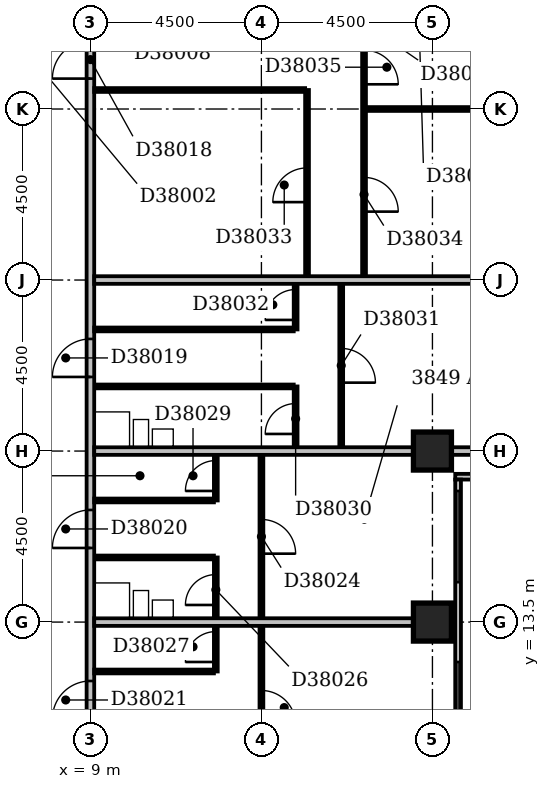
"""IFC4 building model, lengths in metres.
Left out: names, types, materials, properties, quantities, classifications, styles, units other than length and angle.
Written with IfcOpenShell. Run it as: python <this file> out.ifc"""

import sys

from ifc_helpers import new_model, si_unit, direction, frame, frame_2d, origin, origin_2d, place, context, subcontext, project, spatial, rectangle, extrude, element, fill, save


model = new_model("IFC4")
c1 = context("Model", 3, precision=1e-05, world=origin(), true_north=direction((0.0, 1.0)))
c2 = subcontext(c1, "Body", "Model", "MODEL_VIEW")
j1 = project(units=[si_unit("LENGTHUNIT", "METRE"), si_unit("PLANEANGLEUNIT", "RADIAN")], contexts=[c1])
p1 = place(None, origin())
s1 = spatial("IfcSite", under=j1, at=p1, CompositionType="ELEMENT")
p2 = place(p1, origin())
s2 = spatial("IfcBuilding", under=s1, at=p2, CompositionType="ELEMENT")
p3 = place(p2, frame((0.0, 0.0, 152.0)))
s3 = spatial("IfcBuildingStorey", under=s2, at=p3, CompositionType="ELEMENT", Elevation=152.0)
for number, where, z_axis, x_axis in (
    (1, (18.0, 13.5, -0.3), (0.0, 0.0, 1.0), (1.0, 0.0, 0.0)),
    (2, (18.0, 18.0, -0.3), (0.0, 0.0, 1.0), (1.0, 0.0, 0.0)),
):
    element("IfcColumn", number, at=place(p3, frame(where, z_axis=z_axis, x_axis=x_axis)), inside=s3, PredefinedType="COLUMN", context=c2, shape_type="SweptSolid", body=[
        extrude(rectangle(XDim=1.0, YDim=1.0, at=origin_2d()), origin(), (0.0, 0.0, 1.0), 3.6),
    ])
p4 = place(p3, frame((18.675, 8.4, 0.0), z_axis=(0.0, 0.0, 1.0), x_axis=(0.0, 1.0, 0.0)))
e3 = element("IfcWall", 3, at=p4, inside=s3, PredefinedType="STANDARD", context=c2, shape_type="SweptSolid", body=[
    extrude(rectangle(XDim=8.85, YDim=0.15, at=frame_2d((4.425, 0.0))), origin(), (0.0, 0.0, 1.0), 2.7),
])
p5 = place(p4, frame((1.65, 0.0, 0.6)))
e4 = element("IfcOpeningElement", 4, at=p5, cuts=e3, PredefinedType="OPENING", context=c2, shape_type="SweptSolid", body=[
    extrude(rectangle(XDim=2.4, YDim=1.8, at=frame_2d((1.2, 0.9))), frame((0.0, 0.087, 0.0), z_axis=(0.0, -1.0, 0.0), x_axis=(1.0, 0.0, 0.0)), (0.0, 0.0, 1.0), 0.174),
])
p6 = place(p4, frame((6.15, 0.0, 0.6)))
e5 = element("IfcOpeningElement", 5, at=p6, cuts=e3, PredefinedType="OPENING", context=c2, shape_type="SweptSolid", body=[
    extrude(rectangle(XDim=2.4, YDim=1.8, at=frame_2d((1.2, 0.9))), frame((0.0, 0.087, 0.0), z_axis=(0.0, -1.0, 0.0), x_axis=(1.0, 0.0, 0.0)), (0.0, 0.0, 1.0), 0.174),
])
p7 = place(p3, frame((18.6, 17.325, 0.0), z_axis=(0.0, 0.0, 1.0), x_axis=(1.0, 0.0, 0.0)))
e6 = element("IfcWall", 6, at=p7, inside=s3, PredefinedType="STANDARD", context=c2, shape_type="SweptSolid", body=[
    extrude(rectangle(XDim=4.65, YDim=0.15, at=frame_2d((2.325, 0.0))), origin(), (0.0, 0.0, 1.0), 2.7),
])
p8 = place(p7, frame((0.45, 0.0, 0.6)))
e7 = element("IfcOpeningElement", 7, at=p8, cuts=e6, PredefinedType="OPENING", context=c2, shape_type="SweptSolid", body=[
    extrude(rectangle(XDim=2.4, YDim=1.8, at=frame_2d((1.2, 0.9))), frame((0.0, 0.087, 0.0), z_axis=(0.0, -1.0, 0.0), x_axis=(1.0, 0.0, 0.0)), (0.0, 0.0, 1.0), 0.174),
])
p9 = place(p3, frame((9.0, 5.0, 0.0), z_axis=(0.0, 0.0, 1.0), x_axis=(0.0, 1.0, 0.0)))
e8 = element("IfcWall", 8, at=p9, inside=s3, PredefinedType="PARTITIONING", context=c2, shape_type="SweptSolid", body=[
    extrude(rectangle(XDim=27.75, YDim=0.2, at=frame_2d((13.875, 0.0))), origin(), (0.0, 0.0, 1.0), 3.3),
])
p10 = place(p9, frame((22.8, 0.0, 0.0)))
e9 = element("IfcOpeningElement", 9, at=p10, cuts=e8, PredefinedType="OPENING", context=c2, shape_type="SweptSolid", body=[
    extrude(rectangle(XDim=1.0, YDim=2.1, at=frame_2d((0.5, 1.05))), frame((0.0, 0.112, 0.0), z_axis=(0.0, -1.0, 0.0), x_axis=(1.0, 0.0, 0.0)), (0.0, 0.0, 1.0), 0.224),
])
p11 = place(p9, frame((14.95, 0.0, 0.0)))
e10 = element("IfcOpeningElement", 10, at=p11, cuts=e8, PredefinedType="OPENING", context=c2, shape_type="SweptSolid", body=[
    extrude(rectangle(XDim=1.0, YDim=2.1, at=frame_2d((0.5, 1.05))), frame((0.0, 0.112, 0.0), z_axis=(0.0, -1.0, 0.0), x_axis=(1.0, 0.0, 0.0)), (0.0, 0.0, 1.0), 0.224),
])
p12 = place(p9, frame((10.45, 0.0, 0.0)))
e11 = element("IfcOpeningElement", 11, at=p12, cuts=e8, PredefinedType="OPENING", context=c2, shape_type="SweptSolid", body=[
    extrude(rectangle(XDim=1.0, YDim=2.1, at=frame_2d((0.5, 1.05))), frame((0.0, 0.112, 0.0), z_axis=(0.0, -1.0, 0.0), x_axis=(1.0, 0.0, 0.0)), (0.0, 0.0, 1.0), 0.224),
])
p13 = place(p9, frame((5.95, 0.0, 0.0)))
e12 = element("IfcOpeningElement", 12, at=p13, cuts=e8, PredefinedType="OPENING", context=c2, shape_type="SweptSolid", body=[
    extrude(rectangle(XDim=1.0, YDim=2.1, at=frame_2d((0.5, 1.05))), frame((0.0, 0.112, 0.0), z_axis=(0.0, -1.0, 0.0), x_axis=(1.0, 0.0, 0.0)), (0.0, 0.0, 1.0), 0.224),
])
p14 = place(p9, frame((1.5, 0.0, 0.0)))
e13 = element("IfcOpeningElement", 13, at=p14, cuts=e8, PredefinedType="OPENING", context=c2, shape_type="SweptSolid", body=[
    extrude(rectangle(XDim=0.9, YDim=2.1, at=frame_2d((0.45, 1.05))), frame((0.0, 0.112, 0.0), z_axis=(0.0, -1.0, 0.0), x_axis=(1.0, 0.0, 0.0)), (0.0, 0.0, 1.0), 0.224),
])
p15 = place(p3, frame((13.5, 9.5, 0.0), z_axis=(0.0, 0.0, 1.0), x_axis=(0.0, 1.0, 0.0)))
e14 = element("IfcWall", 14, at=p15, inside=s3, PredefinedType="PARTITIONING", context=c2, shape_type="SweptSolid", body=[
    extrude(rectangle(XDim=8.4, YDim=0.1, at=frame_2d((4.2, 0.0))), origin(), (0.0, 0.0, 1.0), 3.3),
])
p16 = place(p15, frame((5.8, 0.0, 0.0)))
e15 = element("IfcOpeningElement", 15, at=p16, cuts=e14, PredefinedType="OPENING", context=c2, shape_type="SweptSolid", body=[
    extrude(rectangle(XDim=0.9, YDim=2.1, at=frame_2d((0.45, 1.05))), frame((0.0, 0.062, 0.0), z_axis=(0.0, -1.0, 0.0), x_axis=(1.0, 0.0, 0.0)), (0.0, 0.0, 1.0), 0.124),
])
p17 = place(p15, frame((1.3, 0.0, 0.0)))
e16 = element("IfcOpeningElement", 16, at=p17, cuts=e14, PredefinedType="OPENING", context=c2, shape_type="SweptSolid", body=[
    extrude(rectangle(XDim=0.9, YDim=2.1, at=frame_2d((0.45, 1.05))), frame((0.0, 0.062, 0.0), z_axis=(0.0, -1.0, 0.0), x_axis=(1.0, 0.0, 0.0)), (0.0, 0.0, 1.0), 0.124),
])
p18 = place(p3, frame((9.1, 12.2, 0.0), z_axis=(0.0, 0.0, 1.0), x_axis=(1.0, 0.0, 0.0)))
e17 = element("IfcWall", 17, at=p18, inside=s3, PredefinedType="PARTITIONING", context=c2, shape_type="SweptSolid", body=[
    extrude(rectangle(XDim=3.15, YDim=0.1, at=frame_2d((1.575, 0.0))), origin(), (0.0, 0.0, 1.0), 3.3),
])
p19 = place(p3, frame((12.3, 12.2, 0.0), z_axis=(0.0, 0.0, 1.0), x_axis=(0.0, 1.0, 0.0)))
e18 = element("IfcWall", 18, at=p19, inside=s3, PredefinedType="PARTITIONING", context=c2, shape_type="SweptSolid", body=[
    extrude(rectangle(XDim=3.0, YDim=0.1, at=frame_2d((1.5, 0.0))), origin(), (0.0, 0.0, 1.0), 3.3),
])
p20 = place(p19, frame((1.75, 0.0, 0.0)))
e19 = element("IfcOpeningElement", 19, at=p20, cuts=e18, PredefinedType="OPENING", context=c2, shape_type="SweptSolid", body=[
    extrude(rectangle(XDim=0.8, YDim=2.1, at=frame_2d((0.4, 1.05))), frame((0.0, 0.062, 0.0), z_axis=(0.0, -1.0, 0.0), x_axis=(1.0, 0.0, 0.0)), (0.0, 0.0, 1.0), 0.124),
])
p21 = place(p19, frame((0.25, 0.0, 0.0)))
e20 = element("IfcOpeningElement", 20, at=p21, cuts=e18, PredefinedType="OPENING", context=c2, shape_type="SweptSolid", body=[
    extrude(rectangle(XDim=0.8, YDim=2.1, at=frame_2d((0.4, 1.05))), frame((0.0, 0.062, 0.0), z_axis=(0.0, -1.0, 0.0), x_axis=(1.0, 0.0, 0.0)), (0.0, 0.0, 1.0), 0.124),
])
p22 = place(p3, frame((9.1, 13.5, 0.0), z_axis=(0.0, 0.0, 1.0), x_axis=(1.0, 0.0, 0.0)))
e21 = element("IfcWall", 21, at=p22, inside=s3, PredefinedType="PARTITIONING", context=c2, shape_type="SweptSolid", body=[
    extrude(rectangle(XDim=8.4, YDim=0.2, at=frame_2d((4.2, 0.0))), origin(), (0.0, 0.0, 1.0), 3.3),
])
p23 = place(p3, frame((9.1, 15.2, 0.0), z_axis=(0.0, 0.0, 1.0), x_axis=(1.0, 0.0, 0.0)))
e22 = element("IfcWall", 22, at=p23, inside=s3, PredefinedType="PLUMBINGWALL", context=c2, shape_type="SweptSolid", body=[
    extrude(rectangle(XDim=3.15, YDim=0.1, at=frame_2d((1.575, 0.0))), origin(), (0.0, 0.0, 1.0), 3.3),
])
p24 = place(p3, frame((9.1, 16.7, 0.0), z_axis=(0.0, 0.0, 1.0), x_axis=(1.0, 0.0, 0.0)))
e23 = element("IfcWall", 23, at=p24, inside=s3, PredefinedType="PARTITIONING", context=c2, shape_type="SweptSolid", body=[
    extrude(rectangle(XDim=3.15, YDim=0.1, at=frame_2d((1.575, 0.0))), origin(), (0.0, 0.0, 1.0), 3.3),
])
p25 = place(p3, frame((12.3, 16.7, 0.0), z_axis=(0.0, 0.0, 1.0), x_axis=(0.0, 1.0, 0.0)))
e24 = element("IfcWall", 24, at=p25, inside=s3, PredefinedType="PARTITIONING", context=c2, shape_type="SweptSolid", body=[
    extrude(rectangle(XDim=1.2, YDim=0.1, at=frame_2d((0.6, 0.0))), origin(), (0.0, 0.0, 1.0), 3.3),
])
p26 = place(p25, frame((0.25, 0.0, 0.0)))
e25 = element("IfcOpeningElement", 25, at=p26, cuts=e24, PredefinedType="OPENING", context=c2, shape_type="SweptSolid", body=[
    extrude(rectangle(XDim=0.8, YDim=2.1, at=frame_2d((0.4, 1.05))), frame((0.0, 0.062, 0.0), z_axis=(0.0, -1.0, 0.0), x_axis=(1.0, 0.0, 0.0)), (0.0, 0.0, 1.0), 0.124),
])
p27 = place(p3, frame((9.1, 18.0, 0.0), z_axis=(0.0, 0.0, 1.0), x_axis=(1.0, 0.0, 0.0)))
e26 = element("IfcWall", 26, at=p27, inside=s3, PredefinedType="PARTITIONING", context=c2, shape_type="SweptSolid", body=[
    extrude(rectangle(XDim=8.4, YDim=0.2, at=frame_2d((4.2, 0.0))), origin(), (0.0, 0.0, 1.0), 2.6),
])
p28 = place(p3, frame((18.5, 18.0, 0.0), z_axis=(0.0, 0.0, 1.0), x_axis=(1.0, 0.0, 0.0)))
e27 = element("IfcWall", 27, at=p28, inside=s3, PredefinedType="PARTITIONING", context=c2, shape_type="SweptSolid", body=[
    extrude(rectangle(XDim=3.5, YDim=0.2, at=frame_2d((1.75, 0.0))), origin(), (0.0, 0.0, 1.0), 2.7),
])
p29 = place(p3, frame((14.4, 18.1, 0.0), z_axis=(0.0, 0.0, 1.0), x_axis=(0.0, 1.0, 0.0)))
e28 = element("IfcWall", 28, at=p29, inside=s3, PredefinedType="PARTITIONING", context=c2, shape_type="SweptSolid", body=[
    extrude(rectangle(XDim=1.6, YDim=0.1, at=frame_2d((0.8, 0.0))), origin(), (0.0, 0.0, 1.0), 3.3),
])
p30 = place(p29, frame((0.35, 0.0, 0.0)))
e29 = element("IfcOpeningElement", 29, at=p30, cuts=e28, PredefinedType="OPENING", context=c2, shape_type="SweptSolid", body=[
    extrude(rectangle(XDim=0.8, YDim=2.1, at=frame_2d((0.4, 1.05))), frame((0.0, 0.062, 0.0), z_axis=(0.0, -1.0, 0.0), x_axis=(1.0, 0.0, 0.0)), (0.0, 0.0, 1.0), 0.124),
])
p31 = place(p3, frame((15.6, 18.1, 0.0), z_axis=(0.0, 0.0, 1.0), x_axis=(0.0, 1.0, 0.0)))
e30 = element("IfcWall", 30, at=p31, inside=s3, PredefinedType="PARTITIONING", context=c2, shape_type="SweptSolid", body=[
    extrude(rectangle(XDim=4.3, YDim=0.1, at=frame_2d((2.15, 0.0))), origin(), (0.0, 0.0, 1.0), 3.3),
])
p32 = place(p31, frame((1.7, 0.0, 0.0)))
e31 = element("IfcOpeningElement", 31, at=p32, cuts=e30, PredefinedType="OPENING", context=c2, shape_type="SweptSolid", body=[
    extrude(rectangle(XDim=0.9, YDim=2.1, at=frame_2d((0.45, 1.05))), frame((0.0, 0.062, 0.0), z_axis=(0.0, -1.0, 0.0), x_axis=(1.0, 0.0, 0.0)), (0.0, 0.0, 1.0), 0.124),
])
p33 = place(p3, frame((9.1, 19.7, 0.0), z_axis=(0.0, 0.0, 1.0), x_axis=(1.0, 0.0, 0.0)))
e32 = element("IfcWall", 32, at=p33, inside=s3, PredefinedType="PLUMBINGWALL", context=c2, shape_type="SweptSolid", body=[
    extrude(rectangle(XDim=5.25, YDim=0.1, at=frame_2d((2.625, 0.0))), origin(), (0.0, 0.0, 1.0), 3.3),
])
p34 = place(p3, frame((9.1, 21.2, 0.0), z_axis=(0.0, 0.0, 1.0), x_axis=(1.0, 0.0, 0.0)))
e33 = element("IfcWall", 33, at=p34, inside=s3, PredefinedType="PARTITIONING", context=c2, shape_type="SweptSolid", body=[
    extrude(rectangle(XDim=5.25, YDim=0.1, at=frame_2d((2.625, 0.0))), origin(), (0.0, 0.0, 1.0), 3.3),
])
p35 = place(p3, frame((14.4, 21.2, 0.0), z_axis=(0.0, 0.0, 1.0), x_axis=(0.0, 1.0, 0.0)))
e34 = element("IfcWall", 34, at=p35, inside=s3, PredefinedType="PARTITIONING", context=c2, shape_type="SweptSolid", body=[
    extrude(rectangle(XDim=1.2, YDim=0.1, at=frame_2d((0.6, 0.0))), origin(), (0.0, 0.0, 1.0), 3.3),
])
p36 = place(p35, frame((0.25, 0.0, 0.0)))
e35 = element("IfcOpeningElement", 35, at=p36, cuts=e34, PredefinedType="OPENING", context=c2, shape_type="SweptSolid", body=[
    extrude(rectangle(XDim=0.8, YDim=2.1, at=frame_2d((0.4, 1.05))), frame((0.0, 0.062, 0.0), z_axis=(0.0, -1.0, 0.0), x_axis=(1.0, 0.0, 0.0)), (0.0, 0.0, 1.0), 0.124),
])
p37 = place(p3, frame((9.1, 22.5, 0.0), z_axis=(0.0, 0.0, 1.0), x_axis=(1.0, 0.0, 0.0)))
e36 = element("IfcWall", 36, at=p37, inside=s3, PredefinedType="PARTITIONING", context=c2, shape_type="SweptSolid", body=[
    extrude(rectangle(XDim=12.9, YDim=0.2, at=frame_2d((6.45, 0.0))), origin(), (0.0, 0.0, 1.0), 3.3),
])
p38 = place(p3, frame((14.7, 22.6, 0.0), z_axis=(0.0, 0.0, 1.0), x_axis=(0.0, 1.0, 0.0)))
e37 = element("IfcWall", 37, at=p38, inside=s3, PredefinedType="PARTITIONING", context=c2, shape_type="SweptSolid", body=[
    extrude(rectangle(XDim=4.9, YDim=0.1, at=frame_2d((2.45, 0.0))), origin(), (0.0, 0.0, 1.0), 3.3),
])
p39 = place(p38, frame((1.95, 0.0, 0.0)))
e38 = element("IfcOpeningElement", 38, at=p39, cuts=e37, PredefinedType="OPENING", context=c2, shape_type="SweptSolid", body=[
    extrude(rectangle(XDim=0.9, YDim=2.1, at=frame_2d((0.45, 1.05))), frame((0.0, 0.062, 0.0), z_axis=(0.0, -1.0, 0.0), x_axis=(1.0, 0.0, 0.0)), (0.0, 0.0, 1.0), 0.124),
])
p40 = place(p3, frame((16.2, 22.6, 0.0), z_axis=(0.0, 0.0, 1.0), x_axis=(0.0, 1.0, 0.0)))
e39 = element("IfcWall", 39, at=p40, inside=s3, PredefinedType="PARTITIONING", context=c2, shape_type="SweptSolid", body=[
    extrude(rectangle(XDim=8.8, YDim=0.1, at=frame_2d((4.4, 0.0))), origin(), (0.0, 0.0, 1.0), 3.3),
])
p41 = place(p40, frame((1.7, 0.0, 0.0)))
e40 = element("IfcOpeningElement", 40, at=p41, cuts=e39, PredefinedType="OPENING", context=c2, shape_type="SweptSolid", body=[
    extrude(rectangle(XDim=0.9, YDim=2.1, at=frame_2d((0.45, 1.05))), frame((0.0, 0.062, 0.0), z_axis=(0.0, -1.0, 0.0), x_axis=(1.0, 0.0, 0.0)), (0.0, 0.0, 1.0), 0.124),
])
p42 = place(p40, frame((5.05, 0.0, 0.0)))
e41 = element("IfcOpeningElement", 41, at=p42, cuts=e39, PredefinedType="OPENING", context=c2, shape_type="SweptSolid", body=[
    extrude(rectangle(XDim=0.9, YDim=2.1, at=frame_2d((0.45, 1.05))), frame((0.0, 0.062, 0.0), z_axis=(0.0, -1.0, 0.0), x_axis=(1.0, 0.0, 0.0)), (0.0, 0.0, 1.0), 0.124),
])
p43 = place(p3, frame((16.25, 27.0, 0.0), z_axis=(0.0, 0.0, 1.0), x_axis=(1.0, 0.0, 0.0)))
e42 = element("IfcWall", 42, at=p43, inside=s3, PredefinedType="PARTITIONING", context=c2, shape_type="SweptSolid", body=[
    extrude(rectangle(XDim=5.75, YDim=0.1, at=frame_2d((2.875, 0.0))), origin(), (0.0, 0.0, 1.0), 2.7),
])
p44 = place(p3, frame((9.1, 27.5, 0.0), z_axis=(0.0, 0.0, 1.0), x_axis=(1.0, 0.0, 0.0)))
e43 = element("IfcWall", 43, at=p44, inside=s3, PredefinedType="PARTITIONING", context=c2, shape_type="SweptSolid", body=[
    extrude(rectangle(XDim=5.55, YDim=0.1, at=frame_2d((2.775, 0.0))), origin(), (0.0, 0.0, 1.0), 2.7),
])
p45 = place(p5, origin())
e44 = element("IfcWindow", 44, at=p45, inside=s3, PartitioningType="SINGLE_PANEL", PredefinedType="WINDOW", context=c2, shape_type="SweptSolid", body=[
    extrude(rectangle(XDim=2.4, YDim=1.8, at=frame_2d((1.2, 0.9))), frame((0.0, 0.03, 0.0), z_axis=(0.0, -1.0, 0.0), x_axis=(1.0, 0.0, 0.0)), (0.0, 0.0, 1.0), 0.06),
])
fill(e4, e44)
p46 = place(p6, origin())
e45 = element("IfcWindow", 45, at=p46, inside=s3, PartitioningType="SINGLE_PANEL", PredefinedType="WINDOW", context=c2, shape_type="SweptSolid", body=[
    extrude(rectangle(XDim=2.4, YDim=1.8, at=frame_2d((1.2, 0.9))), frame((0.0, 0.03, 0.0), z_axis=(0.0, -1.0, 0.0), x_axis=(1.0, 0.0, 0.0)), (0.0, 0.0, 1.0), 0.06),
])
fill(e5, e45)
p47 = place(p10, origin())
e46 = element("IfcDoor", 46, at=p47, inside=s3, OperationType="SINGLE_SWING_LEFT", PredefinedType="DOOR", context=c2, shape_type="SweptSolid", body=[
    extrude(rectangle(XDim=1.0, YDim=2.1, at=frame_2d((0.5, 1.05))), frame((0.0, 0.025, 0.0), z_axis=(0.0, -1.0, 0.0), x_axis=(1.0, 0.0, 0.0)), (0.0, 0.0, 1.0), 0.05),
])
fill(e9, e46)
p48 = place(p11, origin())
e47 = element("IfcDoor", 47, at=p48, inside=s3, OperationType="SINGLE_SWING_LEFT", PredefinedType="DOOR", context=c2, shape_type="SweptSolid", body=[
    extrude(rectangle(XDim=1.0, YDim=2.1, at=frame_2d((0.5, 1.05))), frame((0.0, 0.025, 0.0), z_axis=(0.0, -1.0, 0.0), x_axis=(1.0, 0.0, 0.0)), (0.0, 0.0, 1.0), 0.05),
])
fill(e10, e47)
p49 = place(p12, origin())
e48 = element("IfcDoor", 48, at=p49, inside=s3, OperationType="SINGLE_SWING_LEFT", PredefinedType="DOOR", context=c2, shape_type="SweptSolid", body=[
    extrude(rectangle(XDim=1.0, YDim=2.1, at=frame_2d((0.5, 1.05))), frame((0.0, 0.025, 0.0), z_axis=(0.0, -1.0, 0.0), x_axis=(1.0, 0.0, 0.0)), (0.0, 0.0, 1.0), 0.05),
])
fill(e11, e48)
p50 = place(p13, origin())
e49 = element("IfcDoor", 49, at=p50, inside=s3, OperationType="SINGLE_SWING_LEFT", PredefinedType="DOOR", context=c2, shape_type="SweptSolid", body=[
    extrude(rectangle(XDim=1.0, YDim=2.1, at=frame_2d((0.5, 1.05))), frame((0.0, 0.025, 0.0), z_axis=(0.0, -1.0, 0.0), x_axis=(1.0, 0.0, 0.0)), (0.0, 0.0, 1.0), 0.05),
])
fill(e12, e49)
p51 = place(p16, frame((0.9, 0.0, 0.0), z_axis=(0.0, 0.0, 1.0), x_axis=(-1.0, 0.0, 0.0)))
e50 = element("IfcDoor", 50, at=p51, inside=s3, OperationType="SINGLE_SWING_RIGHT", PredefinedType="DOOR", context=c2, shape_type="SweptSolid", body=[
    extrude(rectangle(XDim=0.9, YDim=2.1, at=frame_2d((0.45, 1.05))), frame((0.0, 0.025, 0.0), z_axis=(0.0, -1.0, 0.0), x_axis=(1.0, 0.0, 0.0)), (0.0, 0.0, 1.0), 0.05),
])
fill(e15, e50)
p52 = place(p17, frame((0.9, 0.0, 0.0), z_axis=(0.0, 0.0, 1.0), x_axis=(-1.0, 0.0, 0.0)))
e51 = element("IfcDoor", 51, at=p52, inside=s3, OperationType="SINGLE_SWING_RIGHT", PredefinedType="DOOR", context=c2, shape_type="SweptSolid", body=[
    extrude(rectangle(XDim=0.9, YDim=2.1, at=frame_2d((0.45, 1.05))), frame((0.0, 0.025, 0.0), z_axis=(0.0, -1.0, 0.0), x_axis=(1.0, 0.0, 0.0)), (0.0, 0.0, 1.0), 0.05),
])
fill(e16, e51)
p53 = place(p20, origin())
e52 = element("IfcDoor", 52, at=p53, inside=s3, OperationType="SINGLE_SWING_LEFT", PredefinedType="DOOR", context=c2, shape_type="SweptSolid", body=[
    extrude(rectangle(XDim=0.8, YDim=2.1, at=frame_2d((0.4, 1.05))), frame((0.0, 0.025, 0.0), z_axis=(0.0, -1.0, 0.0), x_axis=(1.0, 0.0, 0.0)), (0.0, 0.0, 1.0), 0.05),
])
fill(e19, e52)
p54 = place(p21, origin())
e53 = element("IfcDoor", 53, at=p54, inside=s3, OperationType="SINGLE_SWING_LEFT", PredefinedType="DOOR", context=c2, shape_type="SweptSolid", body=[
    extrude(rectangle(XDim=0.8, YDim=2.1, at=frame_2d((0.4, 1.05))), frame((0.0, 0.025, 0.0), z_axis=(0.0, -1.0, 0.0), x_axis=(1.0, 0.0, 0.0)), (0.0, 0.0, 1.0), 0.05),
])
fill(e20, e53)
p55 = place(p26, origin())
e54 = element("IfcDoor", 54, at=p55, inside=s3, OperationType="SINGLE_SWING_LEFT", PredefinedType="DOOR", context=c2, shape_type="SweptSolid", body=[
    extrude(rectangle(XDim=0.8, YDim=2.1, at=frame_2d((0.4, 1.05))), frame((0.0, 0.025, 0.0), z_axis=(0.0, -1.0, 0.0), x_axis=(1.0, 0.0, 0.0)), (0.0, 0.0, 1.0), 0.05),
])
fill(e25, e54)
p56 = place(p30, origin())
e55 = element("IfcDoor", 55, at=p56, inside=s3, OperationType="SINGLE_SWING_LEFT", PredefinedType="DOOR", context=c2, shape_type="SweptSolid", body=[
    extrude(rectangle(XDim=0.8, YDim=2.1, at=frame_2d((0.4, 1.05))), frame((0.0, 0.025, 0.0), z_axis=(0.0, -1.0, 0.0), x_axis=(1.0, 0.0, 0.0)), (0.0, 0.0, 1.0), 0.05),
])
fill(e29, e55)
p57 = place(p32, frame((0.9, 0.0, 0.0), z_axis=(0.0, 0.0, 1.0), x_axis=(-1.0, 0.0, 0.0)))
e56 = element("IfcDoor", 56, at=p57, inside=s3, OperationType="SINGLE_SWING_RIGHT", PredefinedType="DOOR", context=c2, shape_type="SweptSolid", body=[
    extrude(rectangle(XDim=0.9, YDim=2.1, at=frame_2d((0.45, 1.05))), frame((0.0, 0.025, 0.0), z_axis=(0.0, -1.0, 0.0), x_axis=(1.0, 0.0, 0.0)), (0.0, 0.0, 1.0), 0.05),
])
fill(e31, e56)
p58 = place(p36, origin())
e57 = element("IfcDoor", 57, at=p58, inside=s3, OperationType="SINGLE_SWING_LEFT", PredefinedType="DOOR", context=c2, shape_type="SweptSolid", body=[
    extrude(rectangle(XDim=0.8, YDim=2.1, at=frame_2d((0.4, 1.05))), frame((0.0, 0.025, 0.0), z_axis=(0.0, -1.0, 0.0), x_axis=(1.0, 0.0, 0.0)), (0.0, 0.0, 1.0), 0.05),
])
fill(e35, e57)
p59 = place(p39, origin())
e58 = element("IfcDoor", 58, at=p59, inside=s3, OperationType="SINGLE_SWING_LEFT", PredefinedType="DOOR", context=c2, shape_type="SweptSolid", body=[
    extrude(rectangle(XDim=0.9, YDim=2.1, at=frame_2d((0.45, 1.05))), frame((0.0, 0.025, 0.0), z_axis=(0.0, -1.0, 0.0), x_axis=(1.0, 0.0, 0.0)), (0.0, 0.0, 1.0), 0.05),
])
fill(e38, e58)
p60 = place(p41, frame((0.9, 0.0, 0.0), z_axis=(0.0, 0.0, 1.0), x_axis=(-1.0, 0.0, 0.0)))
e59 = element("IfcDoor", 59, at=p60, inside=s3, OperationType="SINGLE_SWING_RIGHT", PredefinedType="DOOR", context=c2, shape_type="SweptSolid", body=[
    extrude(rectangle(XDim=0.9, YDim=2.1, at=frame_2d((0.45, 1.05))), frame((0.0, 0.025, 0.0), z_axis=(0.0, -1.0, 0.0), x_axis=(1.0, 0.0, 0.0)), (0.0, 0.0, 1.0), 0.05),
])
fill(e40, e59)
p61 = place(p42, frame((0.9, 0.0, 0.0), z_axis=(0.0, 0.0, 1.0), x_axis=(-1.0, 0.0, 0.0)))
e60 = element("IfcDoor", 60, at=p61, inside=s3, OperationType="SINGLE_SWING_RIGHT", PredefinedType="DOOR", context=c2, shape_type="SweptSolid", body=[
    extrude(rectangle(XDim=0.9, YDim=2.1, at=frame_2d((0.45, 1.05))), frame((0.0, 0.025, 0.0), z_axis=(0.0, -1.0, 0.0), x_axis=(1.0, 0.0, 0.0)), (0.0, 0.0, 1.0), 0.05),
])
fill(e41, e60)
save(model, sys.argv[1])
